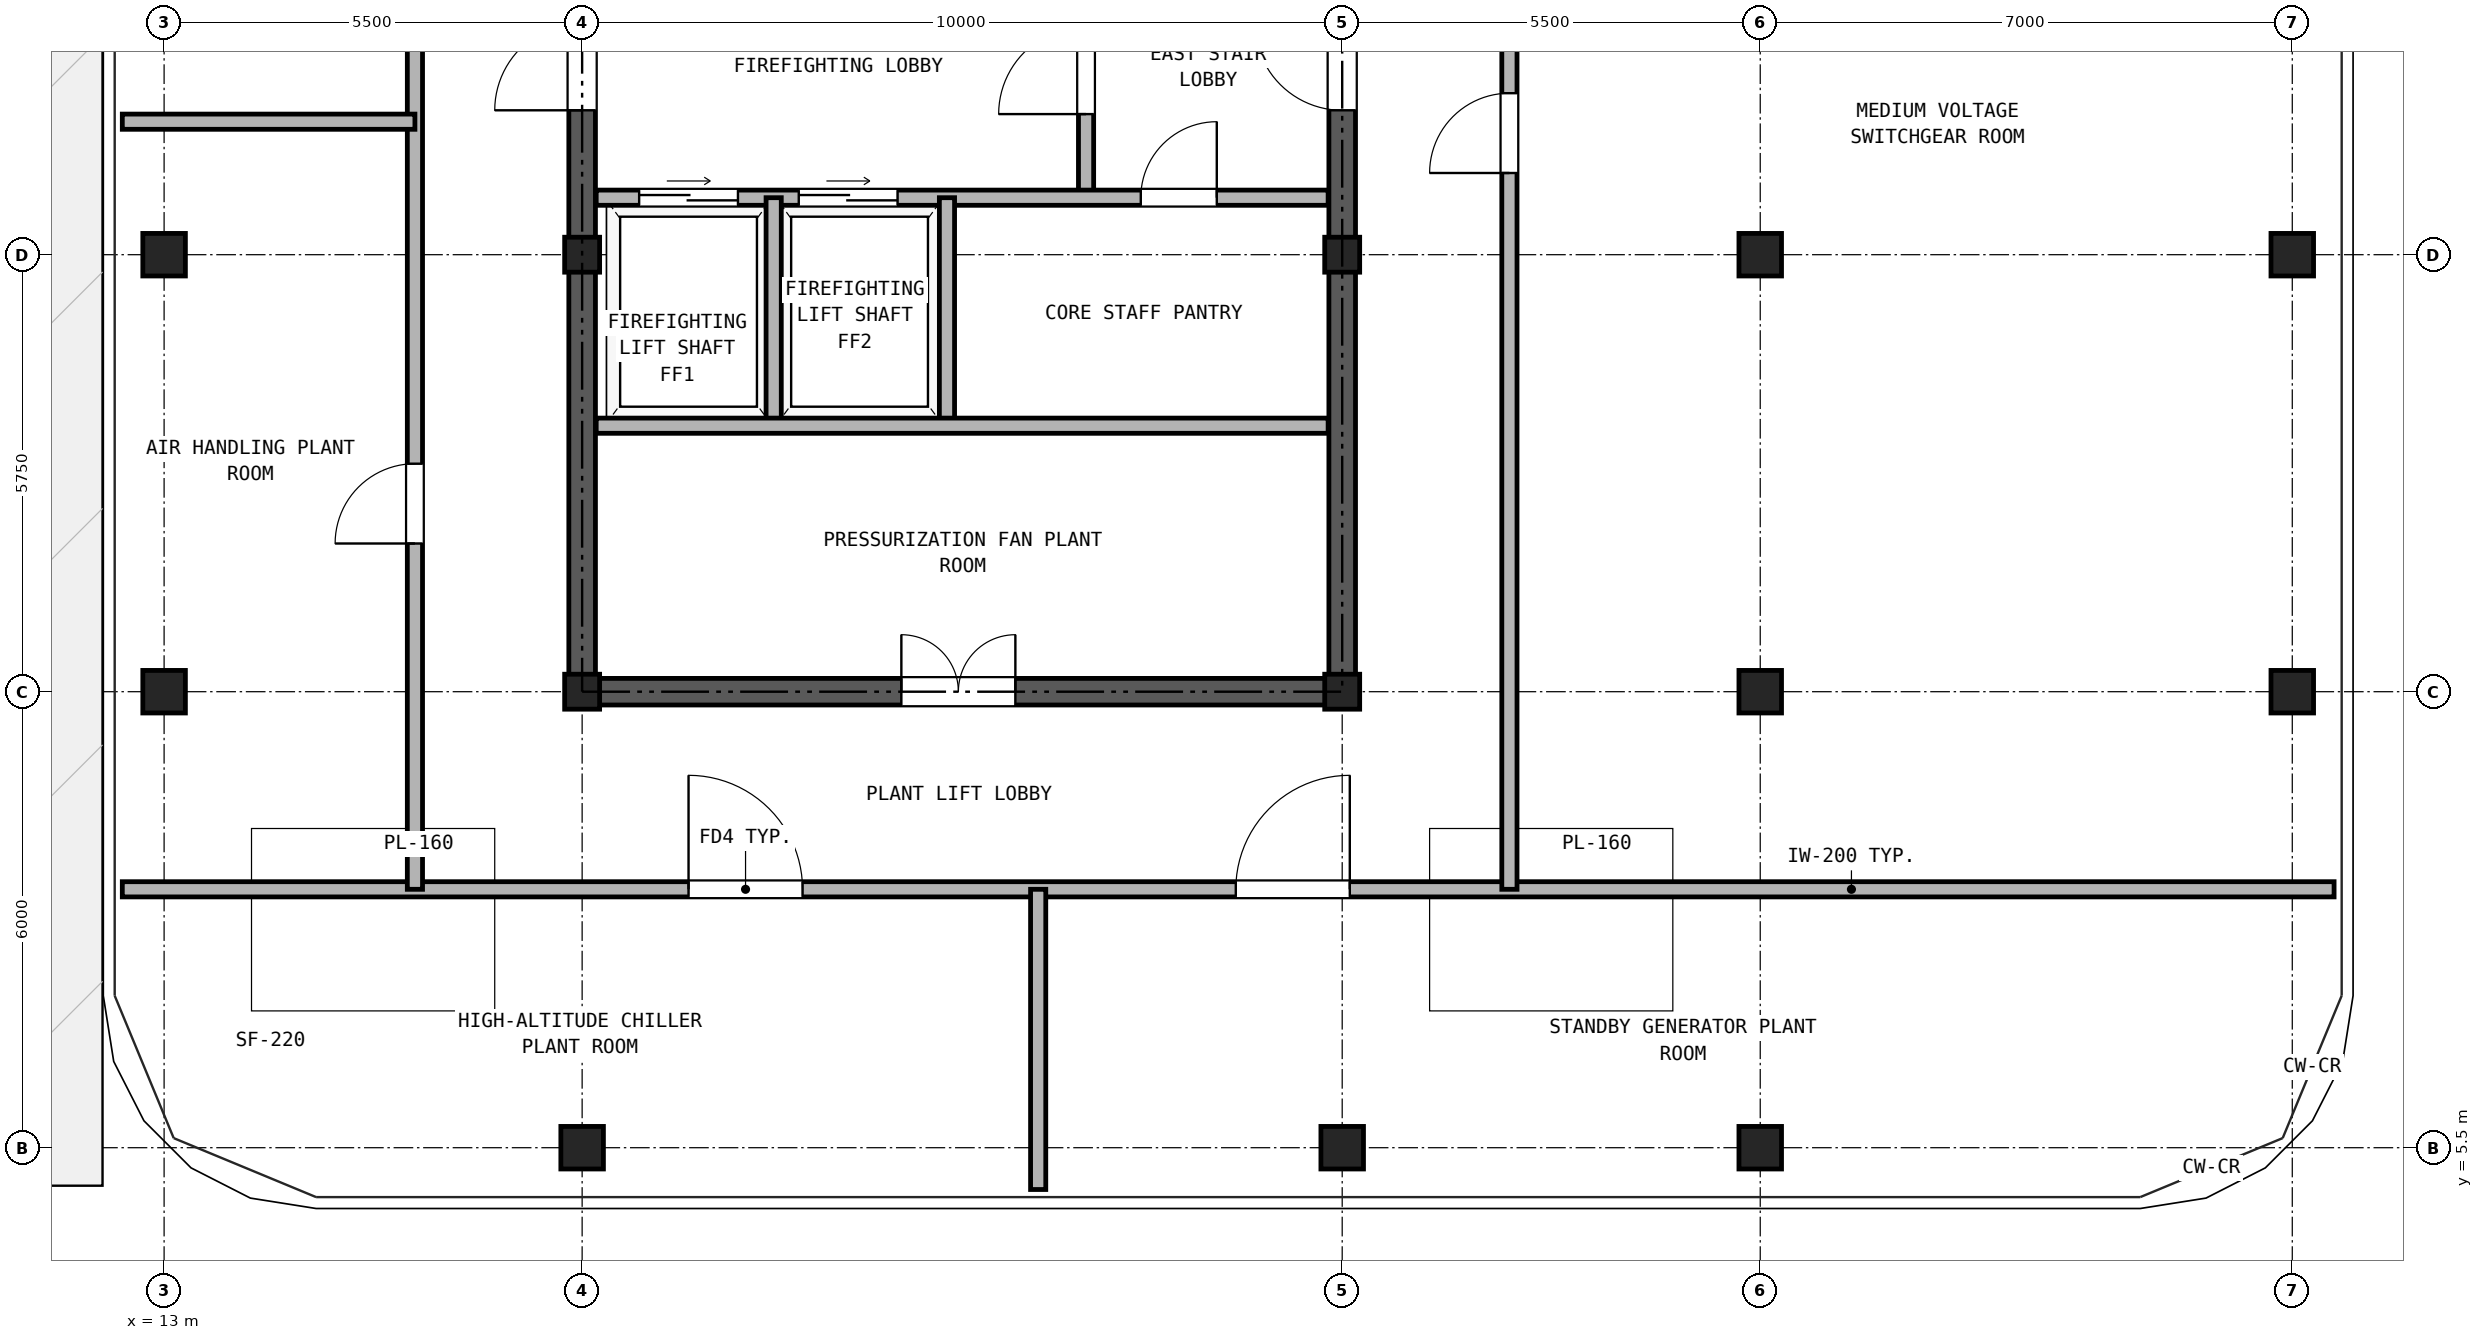
"""IFC4 building model, lengths in metres.
Left out: names, types, materials, properties, quantities, classifications, styles, units other than length and angle.
Written with IfcOpenShell. Run it as: python <this file> out.ifc"""

import sys

from ifc_helpers import new_model, si_unit, direction, frame, frame_2d, origin, origin_2d, place, context, subcontext, project, spatial, rectangle, hollow_rectangle, extrude, source, transform, mapped, element, fill, save


model = new_model("IFC4")
c1 = context("Model", 3, precision=1e-05, world=origin(), true_north=direction((0.0, 1.0)))
c2 = subcontext(c1, "Body", "Model", "MODEL_VIEW")
j1 = project(units=[si_unit("LENGTHUNIT", "METRE"), si_unit("PLANEANGLEUNIT", "RADIAN")], contexts=[c1])
p1 = place(None, origin())
s1 = spatial("IfcSite", under=j1, at=p1, CompositionType="ELEMENT")
p2 = place(p1, origin())
s2 = spatial("IfcBuilding", under=s1, at=p2, CompositionType="ELEMENT")
p3 = place(p2, frame((0.0, 0.0, 278.5)))
s3 = spatial("IfcBuildingStorey", under=s2, at=p3, CompositionType="ELEMENT", Elevation=278.5)
m1 = source(origin(), c2, "Body", "SweptSolid", [
    extrude(hollow_rectangle(XDim=0.56, YDim=0.56, WallThickness=0.03, at=origin_2d()), origin(), (0.0, 0.0, 1.0), 3.38),
])
for number, where, z_axis, x_axis in (
    (1, (18.5, 5.5, 0.0), (0.0, 0.0, 1.0), (1.0, 0.0, 0.0)),
    (2, (28.5, 5.5, 0.0), (0.0, 0.0, 1.0), (1.0, 0.0, 0.0)),
    (3, (34.0, 5.5, 0.0), (0.0, 0.0, 1.0), (1.0, 0.0, 0.0)),
    (4, (13.0, 11.5, 0.0), (0.0, 0.0, 1.0), (1.0, 0.0, 0.0)),
    (5, (41.0, 11.5, 0.0), (0.0, 0.0, 1.0), (1.0, 0.0, 0.0)),
    (6, (13.0, 17.25, 0.0), (0.0, 0.0, 1.0), (1.0, 0.0, 0.0)),
    (7, (41.0, 17.25, 0.0), (0.0, 0.0, 1.0), (1.0, 0.0, 0.0)),
):
    element("IfcColumn", number, at=place(p3, frame(where, z_axis=z_axis, x_axis=x_axis)), inside=s3, PredefinedType="COLUMN", context=c2, shape_type="MappedRepresentation", body=[
        mapped(m1, transform((0.0, 0.0, 0.0), x_axis=(1.0, 0.0, 0.0), y_axis=(0.0, 1.0, 0.0), z_axis=(0.0, 0.0, 1.0), scale=1.0)),
    ])
m2 = source(origin(), c2, "Body", "SweptSolid", [
    extrude(hollow_rectangle(XDim=0.46, YDim=0.46, WallThickness=0.025, at=origin_2d()), origin(), (0.0, 0.0, 1.0), 3.38),
])
for number, where, z_axis, x_axis in (
    (8, (18.5, 11.5, 0.0), (0.0, 0.0, 1.0), (1.0, 0.0, 0.0)),
    (9, (18.5, 17.25, 0.0), (0.0, 0.0, 1.0), (1.0, 0.0, 0.0)),
    (10, (28.5, 11.5, 0.0), (0.0, 0.0, 1.0), (1.0, 0.0, 0.0)),
    (11, (28.5, 17.25, 0.0), (0.0, 0.0, 1.0), (1.0, 0.0, 0.0)),
):
    element("IfcColumn", number, at=place(p3, frame(where, z_axis=z_axis, x_axis=x_axis)), inside=s3, PredefinedType="COLUMN", context=c2, shape_type="MappedRepresentation", body=[
        mapped(m2, transform((0.0, 0.0, 0.0), x_axis=(1.0, 0.0, 0.0), y_axis=(0.0, 1.0, 0.0), z_axis=(0.0, 0.0, 1.0), scale=1.0)),
    ])
for number, where, z_axis, x_axis in (
    (12, (34.0, 11.5, 0.0), (0.0, 0.0, 1.0), (1.0, 0.0, 0.0)),
    (13, (34.0, 17.25, 0.0), (0.0, 0.0, 1.0), (1.0, 0.0, 0.0)),
):
    element("IfcColumn", number, at=place(p3, frame(where, z_axis=z_axis, x_axis=x_axis)), inside=s3, PredefinedType="COLUMN", context=c2, shape_type="MappedRepresentation", body=[
        mapped(m1, transform((0.0, 0.0, 0.0), x_axis=(1.0, 0.0, 0.0), y_axis=(0.0, 1.0, 0.0), z_axis=(0.0, 0.0, 1.0), scale=1.0)),
    ])
p4 = place(p3, frame((18.325, 11.5, 0.0), z_axis=(0.0, 0.0, 1.0), x_axis=(1.0, 0.0, 0.0)))
e14 = element("IfcWall", 14, at=p4, inside=s3, PredefinedType="SHEAR", context=c2, shape_type="SweptSolid", body=[
    extrude(rectangle(XDim=10.35, YDim=0.35, at=frame_2d((5.175, 0.0))), origin(), (0.0, 0.0, 1.0), 3.38),
])
p5 = place(p4, frame((4.375, 0.0, 0.0)))
e15 = element("IfcOpeningElement", 15, at=p5, cuts=e14, PredefinedType="OPENING", context=c2, shape_type="SweptSolid", body=[
    extrude(rectangle(XDim=1.5, YDim=2.25, at=frame_2d((0.75, 1.125))), frame((0.0, 0.185, 0.0), z_axis=(0.0, -1.0, 0.0), x_axis=(1.0, 0.0, 0.0)), (0.0, 0.0, 1.0), 0.37),
])
p6 = place(p3, frame((18.5, 11.675, 0.0), z_axis=(0.0, 0.0, 1.0), x_axis=(0.0, 1.0, 0.0)))
e16 = element("IfcWall", 16, at=p6, inside=s3, PredefinedType="SHEAR", context=c2, shape_type="SweptSolid", body=[
    extrude(rectangle(XDim=16.9, YDim=0.35, at=frame_2d((8.45, 0.0))), origin(), (0.0, 0.0, 1.0), 3.38),
])
p7 = place(p6, frame((7.475, 0.0, 0.0)))
e17 = element("IfcOpeningElement", 17, at=p7, cuts=e16, PredefinedType="OPENING", context=c2, shape_type="SweptSolid", body=[
    extrude(rectangle(XDim=1.15, YDim=2.2, at=frame_2d((0.575, 1.1))), frame((0.0, 0.185, 0.0), z_axis=(0.0, -1.0, 0.0), x_axis=(1.0, 0.0, 0.0)), (0.0, 0.0, 1.0), 0.37),
])
p8 = place(p3, frame((28.5, 11.675, 0.0), z_axis=(0.0, 0.0, 1.0), x_axis=(0.0, 1.0, 0.0)))
e18 = element("IfcWall", 18, at=p8, inside=s3, PredefinedType="SHEAR", context=c2, shape_type="SweptSolid", body=[
    extrude(rectangle(XDim=16.9, YDim=0.35, at=frame_2d((8.45, 0.0))), origin(), (0.0, 0.0, 1.0), 3.38),
])
p9 = place(p8, frame((7.475, 0.0, 0.0)))
e19 = element("IfcOpeningElement", 19, at=p9, cuts=e18, PredefinedType="OPENING", context=c2, shape_type="SweptSolid", body=[
    extrude(rectangle(XDim=1.15, YDim=2.2, at=frame_2d((0.575, 1.1))), frame((0.0, 0.185, 0.0), z_axis=(0.0, -1.0, 0.0), x_axis=(1.0, 0.0, 0.0)), (0.0, 0.0, 1.0), 0.37),
])
p10 = place(p3, frame((25.13, 18.0, 0.0), z_axis=(0.0, 0.0, 1.0), x_axis=(0.0, 1.0, 0.0)))
e20 = element("IfcWall", 20, at=p10, inside=s3, PredefinedType="PARTITIONING", context=c2, shape_type="SweptSolid", body=[
    extrude(rectangle(XDim=3.39, YDim=0.2, at=frame_2d((1.695, 0.0))), origin(), (0.0, 0.0, 1.0), 3.38),
])
p11 = place(p10, frame((1.1, 0.0, 0.0)))
e21 = element("IfcOpeningElement", 21, at=p11, cuts=e20, PredefinedType="OPENING", context=c2, shape_type="SweptSolid", body=[
    extrude(rectangle(XDim=1.15, YDim=2.2, at=frame_2d((0.575, 1.1))), frame((0.0, 0.11, 0.0), z_axis=(0.0, -1.0, 0.0), x_axis=(1.0, 0.0, 0.0)), (0.0, 0.0, 1.0), 0.22),
])
p12 = place(p3, frame((18.685, 18.0, 0.0), z_axis=(0.0, 0.0, 1.0), x_axis=(1.0, 0.0, 0.0)))
e22 = element("IfcWall", 22, at=p12, inside=s3, PredefinedType="PARTITIONING", context=c2, shape_type="SweptSolid", body=[
    extrude(rectangle(XDim=9.63, YDim=0.2, at=frame_2d((4.815, 0.0))), origin(), (0.0, 0.0, 1.0), 3.38),
])
p13 = place(p12, frame((0.565, 0.0, 0.0)))
e23 = element("IfcOpeningElement", 23, at=p13, cuts=e22, PredefinedType="OPENING", context=c2, shape_type="SweptSolid", body=[
    extrude(rectangle(XDim=1.3, YDim=2.3, at=frame_2d((0.65, 1.15))), frame((0.0, 0.11, 0.0), z_axis=(0.0, -1.0, 0.0), x_axis=(1.0, 0.0, 0.0)), (0.0, 0.0, 1.0), 0.22),
])
p14 = place(p12, frame((2.665, 0.0, 0.0)))
e24 = element("IfcOpeningElement", 24, at=p14, cuts=e22, PredefinedType="OPENING", context=c2, shape_type="SweptSolid", body=[
    extrude(rectangle(XDim=1.3, YDim=2.3, at=frame_2d((0.65, 1.15))), frame((0.0, 0.11, 0.0), z_axis=(0.0, -1.0, 0.0), x_axis=(1.0, 0.0, 0.0)), (0.0, 0.0, 1.0), 0.22),
])
p15 = place(p12, frame((7.165, 0.0, 0.0)))
e25 = element("IfcOpeningElement", 25, at=p15, cuts=e22, PredefinedType="OPENING", context=c2, shape_type="SweptSolid", body=[
    extrude(rectangle(XDim=1.0, YDim=2.15, at=frame_2d((0.5, 1.075))), frame((0.0, 0.11, 0.0), z_axis=(0.0, -1.0, 0.0), x_axis=(1.0, 0.0, 0.0)), (0.0, 0.0, 1.0), 0.22),
])
for number, where, z_axis, x_axis in (
    (26, (21.02, 15.0, 0.0), (0.0, 0.0, 1.0), (0.0, 1.0, 0.0)),
    (27, (23.3, 15.0, 0.0), (0.0, 0.0, 1.0), (0.0, 1.0, 0.0)),
):
    element("IfcWall", number, at=place(p3, frame(where, z_axis=z_axis, x_axis=x_axis)), inside=s3, PredefinedType="PARTITIONING", context=c2, shape_type="SweptSolid", body=[
        extrude(rectangle(XDim=3.0, YDim=0.2, at=frame_2d((1.5, 0.0))), origin(), (0.0, 0.0, 1.0), 3.38),
    ])
p16 = place(p3, frame((18.685, 15.0, 0.0), z_axis=(0.0, 0.0, 1.0), x_axis=(1.0, 0.0, 0.0)))
e28 = element("IfcWall", 28, at=p16, inside=s3, PredefinedType="PARTITIONING", context=c2, shape_type="SweptSolid", body=[
    extrude(rectangle(XDim=9.63, YDim=0.2, at=frame_2d((4.815, 0.0))), origin(), (0.0, 0.0, 1.0), 3.38),
])
p17 = place(p3, frame((12.45, 8.9, 0.0), z_axis=(0.0, 0.0, 1.0), x_axis=(1.0, 0.0, 0.0)))
e29 = element("IfcWall", 29, at=p17, inside=s3, PredefinedType="PARTITIONING", context=c2, shape_type="SweptSolid", body=[
    extrude(rectangle(XDim=29.1, YDim=0.2, at=frame_2d((14.55, 0.0))), origin(), (0.0, 0.0, 1.0), 3.38),
])
p18 = place(p17, frame((7.45, 0.0, 0.0)))
e30 = element("IfcOpeningElement", 30, at=p18, cuts=e29, PredefinedType="OPENING", context=c2, shape_type="SweptSolid", body=[
    extrude(rectangle(XDim=1.5, YDim=2.25, at=frame_2d((0.75, 1.125))), frame((0.0, 0.11, 0.0), z_axis=(0.0, -1.0, 0.0), x_axis=(1.0, 0.0, 0.0)), (0.0, 0.0, 1.0), 0.22),
])
p19 = place(p17, frame((14.65, 0.0, 0.0)))
e31 = element("IfcOpeningElement", 31, at=p19, cuts=e29, PredefinedType="OPENING", context=c2, shape_type="SweptSolid", body=[
    extrude(rectangle(XDim=1.5, YDim=2.25, at=frame_2d((0.75, 1.125))), frame((0.0, 0.11, 0.0), z_axis=(0.0, -1.0, 0.0), x_axis=(1.0, 0.0, 0.0)), (0.0, 0.0, 1.0), 0.22),
])
p20 = place(p3, frame((16.3, 8.9, 0.0), z_axis=(0.0, 0.0, 1.0), x_axis=(0.0, 1.0, 0.0)))
e32 = element("IfcWall", 32, at=p20, inside=s3, PredefinedType="PARTITIONING", context=c2, shape_type="SweptSolid", body=[
    extrude(rectangle(XDim=19.85, YDim=0.2, at=frame_2d((9.925, 0.0))), origin(), (0.0, 0.0, 1.0), 3.38),
])
p21 = place(p20, frame((4.55, 0.0, 0.0)))
e33 = element("IfcOpeningElement", 33, at=p21, cuts=e32, PredefinedType="OPENING", context=c2, shape_type="SweptSolid", body=[
    extrude(rectangle(XDim=1.05, YDim=2.15, at=frame_2d((0.525, 1.075))), frame((0.0, 0.11, 0.0), z_axis=(0.0, -1.0, 0.0), x_axis=(1.0, 0.0, 0.0)), (0.0, 0.0, 1.0), 0.22),
])
p22 = place(p20, frame((14.475, 0.0, 0.0)))
e34 = element("IfcOpeningElement", 34, at=p22, cuts=e32, PredefinedType="OPENING", context=c2, shape_type="SweptSolid", body=[
    extrude(rectangle(XDim=1.05, YDim=2.15, at=frame_2d((0.525, 1.075))), frame((0.0, 0.11, 0.0), z_axis=(0.0, -1.0, 0.0), x_axis=(1.0, 0.0, 0.0)), (0.0, 0.0, 1.0), 0.22),
])
p23 = place(p3, frame((30.7, 8.9, 0.0), z_axis=(0.0, 0.0, 1.0), x_axis=(0.0, 1.0, 0.0)))
e35 = element("IfcWall", 35, at=p23, inside=s3, PredefinedType="PARTITIONING", context=c2, shape_type="SweptSolid", body=[
    extrude(rectangle(XDim=19.85, YDim=0.2, at=frame_2d((9.925, 0.0))), origin(), (0.0, 0.0, 1.0), 3.38),
])
p24 = place(p23, frame((9.425, 0.0, 0.0)))
e36 = element("IfcOpeningElement", 36, at=p24, cuts=e35, PredefinedType="OPENING", context=c2, shape_type="SweptSolid", body=[
    extrude(rectangle(XDim=1.05, YDim=2.15, at=frame_2d((0.525, 1.075))), frame((0.0, 0.11, 0.0), z_axis=(0.0, -1.0, 0.0), x_axis=(1.0, 0.0, 0.0)), (0.0, 0.0, 1.0), 0.22),
])
p25 = place(p3, frame((24.5, 4.95, 0.0), z_axis=(0.0, 0.0, 1.0), x_axis=(0.0, 1.0, 0.0)))
e37 = element("IfcWall", 37, at=p25, inside=s3, PredefinedType="PARTITIONING", context=c2, shape_type="SweptSolid", body=[
    extrude(rectangle(XDim=3.95, YDim=0.2, at=frame_2d((1.975, 0.0))), origin(), (0.0, 0.0, 1.0), 3.38),
])
p26 = place(p3, frame((12.45, 19.0, 0.0), z_axis=(0.0, 0.0, 1.0), x_axis=(1.0, 0.0, 0.0)))
e38 = element("IfcWall", 38, at=p26, inside=s3, PredefinedType="PARTITIONING", context=c2, shape_type="SweptSolid", body=[
    extrude(rectangle(XDim=3.85, YDim=0.2, at=frame_2d((1.925, 0.0))), origin(), (0.0, 0.0, 1.0), 3.38),
])
p27 = place(p11, origin())
e39 = element("IfcDoor", 39, at=p27, inside=s3, OperationType="SINGLE_SWING_LEFT", PredefinedType="DOOR", context=c2, shape_type="SweptSolid", body=[
    extrude(rectangle(XDim=1.15, YDim=2.2, at=frame_2d((0.575, 1.1))), frame((0.0, 0.025, 0.0), z_axis=(0.0, -1.0, 0.0), x_axis=(1.0, 0.0, 0.0)), (0.0, 0.0, 1.0), 0.05),
])
fill(e21, e39)
p28 = place(p13, origin())
e40 = element("IfcDoor", 40, at=p28, inside=s3, OperationType="DOUBLE_DOOR_SLIDING", PredefinedType="DOOR", context=c2, shape_type="SweptSolid", body=[
    extrude(rectangle(XDim=1.3, YDim=2.3, at=frame_2d((0.65, 1.15))), frame((0.0, 0.025, 0.0), z_axis=(0.0, -1.0, 0.0), x_axis=(1.0, 0.0, 0.0)), (0.0, 0.0, 1.0), 0.05),
])
fill(e23, e40)
p29 = place(p14, origin())
e41 = element("IfcDoor", 41, at=p29, inside=s3, OperationType="DOUBLE_DOOR_SLIDING", PredefinedType="DOOR", context=c2, shape_type="SweptSolid", body=[
    extrude(rectangle(XDim=1.3, YDim=2.3, at=frame_2d((0.65, 1.15))), frame((0.0, 0.025, 0.0), z_axis=(0.0, -1.0, 0.0), x_axis=(1.0, 0.0, 0.0)), (0.0, 0.0, 1.0), 0.05),
])
fill(e24, e41)
p30 = place(p15, frame((1.0, 0.0, 0.0), z_axis=(0.0, 0.0, 1.0), x_axis=(-1.0, 0.0, 0.0)))
e42 = element("IfcDoor", 42, at=p30, inside=s3, OperationType="SINGLE_SWING_RIGHT", PredefinedType="DOOR", context=c2, shape_type="SweptSolid", body=[
    extrude(rectangle(XDim=1.0, YDim=2.15, at=frame_2d((0.5, 1.075))), frame((0.0, 0.025, 0.0), z_axis=(0.0, -1.0, 0.0), x_axis=(1.0, 0.0, 0.0)), (0.0, 0.0, 1.0), 0.05),
])
fill(e25, e42)
p31 = place(p7, frame((1.15, 0.0, 0.0), z_axis=(0.0, 0.0, 1.0), x_axis=(-1.0, 0.0, 0.0)))
e43 = element("IfcDoor", 43, at=p31, inside=s3, OperationType="SINGLE_SWING_LEFT", PredefinedType="DOOR", context=c2, shape_type="SweptSolid", body=[
    extrude(rectangle(XDim=1.15, YDim=2.2, at=frame_2d((0.575, 1.1))), frame((0.0, 0.025, 0.0), z_axis=(0.0, -1.0, 0.0), x_axis=(1.0, 0.0, 0.0)), (0.0, 0.0, 1.0), 0.05),
])
fill(e17, e43)
p32 = place(p9, origin())
e44 = element("IfcDoor", 44, at=p32, inside=s3, OperationType="SINGLE_SWING_RIGHT", PredefinedType="DOOR", context=c2, shape_type="SweptSolid", body=[
    extrude(rectangle(XDim=1.15, YDim=2.2, at=frame_2d((0.575, 1.1))), frame((0.0, 0.025, 0.0), z_axis=(0.0, -1.0, 0.0), x_axis=(1.0, 0.0, 0.0)), (0.0, 0.0, 1.0), 0.05),
])
fill(e19, e44)
p33 = place(p5, frame((1.5, 0.0, 0.0), z_axis=(0.0, 0.0, 1.0), x_axis=(-1.0, 0.0, 0.0)))
e45 = element("IfcDoor", 45, at=p33, inside=s3, OperationType="DOUBLE_DOOR_SINGLE_SWING", PredefinedType="DOOR", context=c2, shape_type="SweptSolid", body=[
    extrude(rectangle(XDim=1.5, YDim=2.25, at=frame_2d((0.75, 1.125))), frame((0.0, 0.025, 0.0), z_axis=(0.0, -1.0, 0.0), x_axis=(1.0, 0.0, 0.0)), (0.0, 0.0, 1.0), 0.05),
])
fill(e15, e45)
p34 = place(p18, frame((1.5, 0.0, 0.0), z_axis=(0.0, 0.0, 1.0), x_axis=(-1.0, 0.0, 0.0)))
e46 = element("IfcDoor", 46, at=p34, inside=s3, OperationType="SINGLE_SWING_LEFT", PredefinedType="DOOR", context=c2, shape_type="SweptSolid", body=[
    extrude(rectangle(XDim=1.5, YDim=2.25, at=frame_2d((0.75, 1.125))), frame((0.0, 0.025, 0.0), z_axis=(0.0, -1.0, 0.0), x_axis=(1.0, 0.0, 0.0)), (0.0, 0.0, 1.0), 0.05),
])
fill(e30, e46)
p35 = place(p19, frame((1.5, 0.0, 0.0), z_axis=(0.0, 0.0, 1.0), x_axis=(-1.0, 0.0, 0.0)))
e47 = element("IfcDoor", 47, at=p35, inside=s3, OperationType="SINGLE_SWING_RIGHT", PredefinedType="DOOR", context=c2, shape_type="SweptSolid", body=[
    extrude(rectangle(XDim=1.5, YDim=2.25, at=frame_2d((0.75, 1.125))), frame((0.0, 0.025, 0.0), z_axis=(0.0, -1.0, 0.0), x_axis=(1.0, 0.0, 0.0)), (0.0, 0.0, 1.0), 0.05),
])
fill(e31, e47)
p36 = place(p21, frame((1.05, 0.0, 0.0), z_axis=(0.0, 0.0, 1.0), x_axis=(-1.0, 0.0, 0.0)))
e48 = element("IfcDoor", 48, at=p36, inside=s3, OperationType="SINGLE_SWING_LEFT", PredefinedType="DOOR", context=c2, shape_type="SweptSolid", body=[
    extrude(rectangle(XDim=1.05, YDim=2.15, at=frame_2d((0.525, 1.075))), frame((0.0, 0.025, 0.0), z_axis=(0.0, -1.0, 0.0), x_axis=(1.0, 0.0, 0.0)), (0.0, 0.0, 1.0), 0.05),
])
fill(e33, e48)
p37 = place(p24, origin())
e49 = element("IfcDoor", 49, at=p37, inside=s3, OperationType="SINGLE_SWING_LEFT", PredefinedType="DOOR", context=c2, shape_type="SweptSolid", body=[
    extrude(rectangle(XDim=1.05, YDim=2.15, at=frame_2d((0.525, 1.075))), frame((0.0, 0.025, 0.0), z_axis=(0.0, -1.0, 0.0), x_axis=(1.0, 0.0, 0.0)), (0.0, 0.0, 1.0), 0.05),
])
fill(e36, e49)
save(model, sys.argv[1])
